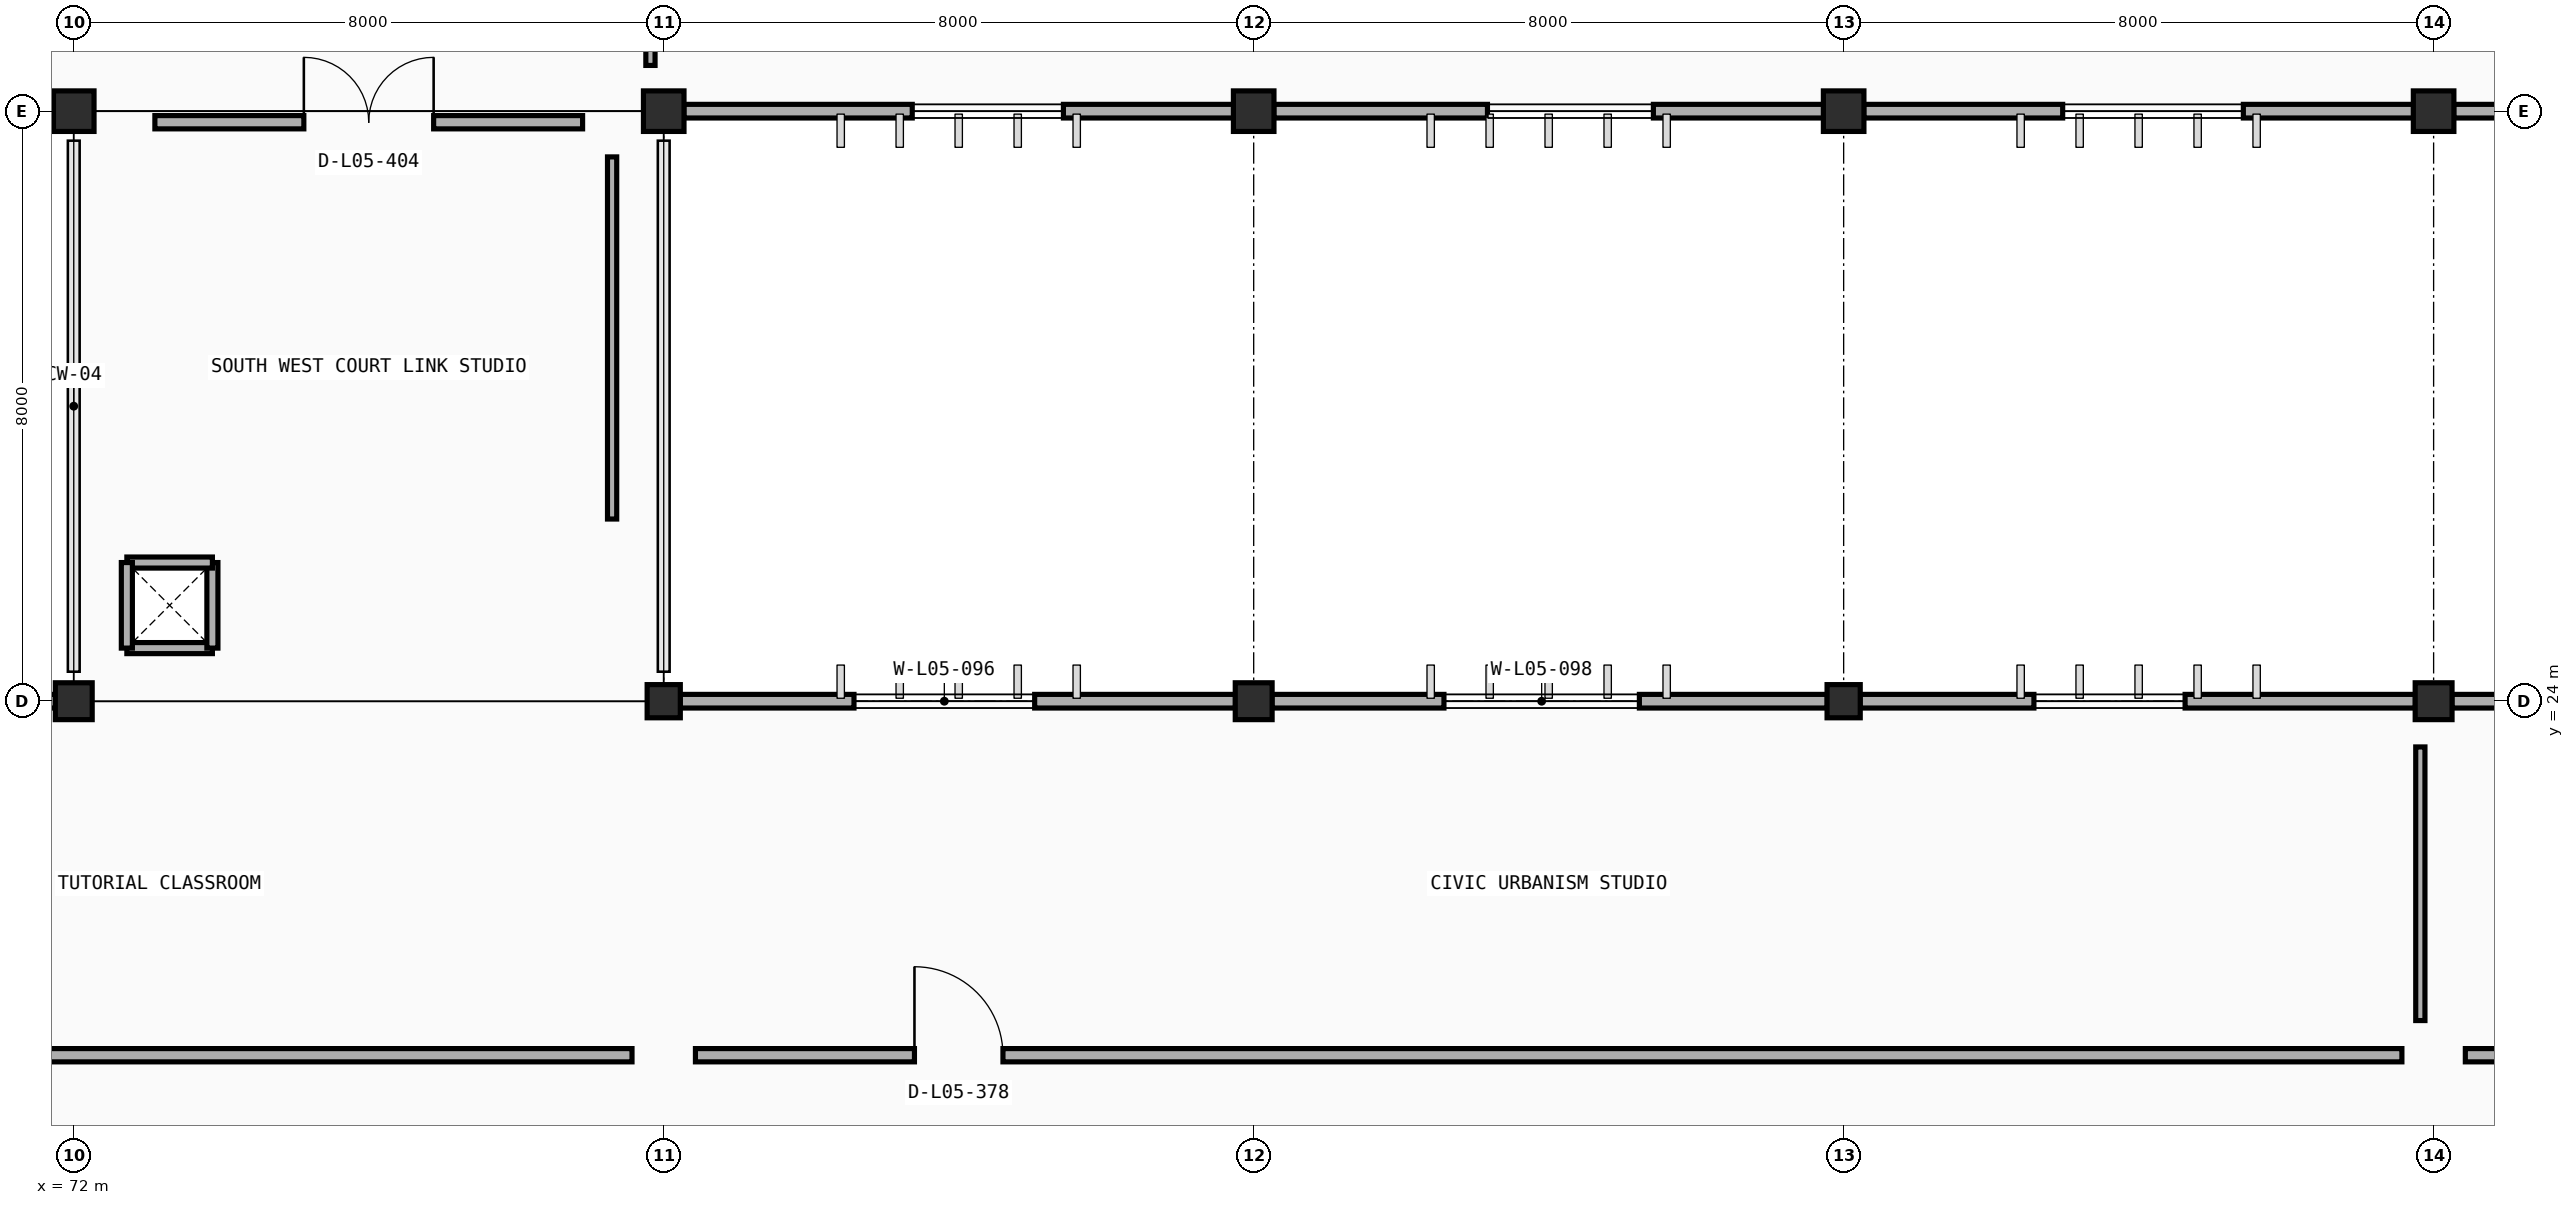
"""IFC4 building model, lengths in metres.
Left out: names, types, materials, properties, quantities, classifications, styles, units other than length and angle.
Written with IfcOpenShell. Run it as: python <this file> out.ifc"""

import sys

from ifc_helpers import new_model, si_unit, direction, frame, frame_2d, origin, origin_2d, place, context, subcontext, project, spatial, rectangle, extrude, element, fill, save


model = new_model("IFC4")
c1 = context("Model", 3, precision=1e-05, world=origin(), true_north=direction((0.0, 1.0)))
c2 = subcontext(c1, "Body", "Model", "MODEL_VIEW")
j1 = project(units=[si_unit("LENGTHUNIT", "METRE"), si_unit("PLANEANGLEUNIT", "RADIAN")], contexts=[c1])
p1 = place(None, origin())
s1 = spatial("IfcSite", under=j1, at=p1, CompositionType="ELEMENT")
p2 = place(p1, origin())
s2 = spatial("IfcBuilding", under=s1, at=p2, CompositionType="ELEMENT")
p3 = place(p2, frame((0.0, 0.0, 18.0)))
s3 = spatial("IfcBuildingStorey", under=s2, at=p3, CompositionType="ELEMENT", Elevation=18.0)
p4 = place(p3, frame((72.0, 24.0, 0.0), z_axis=(0.0, 0.0, 1.0), x_axis=(1.0, 0.0, 0.0)))
e1 = element("IfcColumn", 1, at=p4, inside=s3, PredefinedType="COLUMN", context=c2, shape_type="SweptSolid", body=[
    extrude(rectangle(XDim=0.5, YDim=0.5, at=origin_2d()), origin(), (0.0, 0.0, 1.0), 4.2),
])
p5 = place(p3, frame((80.0, 24.0, 0.0), z_axis=(0.0, 0.0, 1.0), x_axis=(1.0, 0.0, 0.0)))
e2 = element("IfcColumn", 2, at=p5, inside=s3, PredefinedType="COLUMN", context=c2, shape_type="SweptSolid", body=[
    extrude(rectangle(XDim=0.45, YDim=0.45, at=origin_2d()), origin(), (0.0, 0.0, 1.0), 4.2),
])
p6 = place(p3, frame((88.0, 24.0, 0.0), z_axis=(0.0, 0.0, 1.0), x_axis=(1.0, 0.0, 0.0)))
e3 = element("IfcColumn", 3, at=p6, inside=s3, PredefinedType="COLUMN", context=c2, shape_type="SweptSolid", body=[
    extrude(rectangle(XDim=0.5, YDim=0.5, at=origin_2d()), origin(), (0.0, 0.0, 1.0), 4.2),
])
p7 = place(p3, frame((96.0, 24.0, 0.0), z_axis=(0.0, 0.0, 1.0), x_axis=(1.0, 0.0, 0.0)))
e4 = element("IfcColumn", 4, at=p7, inside=s3, PredefinedType="COLUMN", context=c2, shape_type="SweptSolid", body=[
    extrude(rectangle(XDim=0.45, YDim=0.45, at=origin_2d()), origin(), (0.0, 0.0, 1.0), 4.2),
])
p8 = place(p3, frame((104.0, 24.0, 0.0), z_axis=(0.0, 0.0, 1.0), x_axis=(1.0, 0.0, 0.0)))
e5 = element("IfcColumn", 5, at=p8, inside=s3, PredefinedType="COLUMN", context=c2, shape_type="SweptSolid", body=[
    extrude(rectangle(XDim=0.5, YDim=0.5, at=origin_2d()), origin(), (0.0, 0.0, 1.0), 4.2),
])
for number, where, z_axis, x_axis in (
    (6, (72.0, 32.0, 0.0), (0.0, 0.0, 1.0), (1.0, 0.0, 0.0)),
    (7, (80.0, 32.0, 0.0), (0.0, 0.0, 1.0), (1.0, 0.0, 0.0)),
    (8, (88.0, 32.0, 0.0), (0.0, 0.0, 1.0), (1.0, 0.0, 0.0)),
    (9, (96.0, 32.0, 0.0), (0.0, 0.0, 1.0), (1.0, 0.0, 0.0)),
    (10, (104.0, 32.0, 0.0), (0.0, 0.0, 1.0), (1.0, 0.0, 0.0)),
):
    element("IfcColumn", number, at=place(p3, frame(where, z_axis=z_axis, x_axis=x_axis)), inside=s3, PredefinedType="COLUMN", context=c2, shape_type="SweptSolid", body=[
        extrude(rectangle(XDim=0.55, YDim=0.55, at=origin_2d()), origin(), (0.0, 0.0, 1.0), 4.2),
    ])
p9 = place(p3, frame((64.222, 24.0, 0.0), z_axis=(0.0, 0.0, 1.0), x_axis=(1.0, 0.0, 0.0)))
e11 = element("IfcWall", 11, at=p9, inside=s3, PredefinedType="STANDARD", context=c2, shape_type="SweptSolid", body=[
    extrude(rectangle(XDim=7.531, YDim=0.185, at=frame_2d((3.766, 0.0))), origin(), (0.0, 0.0, 1.0), 3.335),
])
p10 = place(p9, frame((2.358, 0.0, 0.9)))
e12 = element("IfcOpeningElement", 12, at=p10, cuts=e11, PredefinedType="OPENING", context=c2, shape_type="SweptSolid", body=[
    extrude(rectangle(XDim=2.05, YDim=1.4, at=frame_2d((1.025, 0.7))), frame((0.0, 0.103, 0.0), z_axis=(0.0, -1.0, 0.0), x_axis=(1.0, 0.0, 0.0)), (0.0, 0.0, 1.0), 0.205),
])
p11 = place(p3, frame((80.222, 24.0, 0.0), z_axis=(0.0, 0.0, 1.0), x_axis=(1.0, 0.0, 0.0)))
e13 = element("IfcWall", 13, at=p11, inside=s3, PredefinedType="STANDARD", context=c2, shape_type="SweptSolid", body=[
    extrude(rectangle(XDim=7.531, YDim=0.185, at=frame_2d((3.766, 0.0))), origin(), (0.0, 0.0, 1.0), 3.335),
])
p12 = place(p11, frame((2.358, 0.0, 0.9)))
e14 = element("IfcOpeningElement", 14, at=p12, cuts=e13, PredefinedType="OPENING", context=c2, shape_type="SweptSolid", body=[
    extrude(rectangle(XDim=2.45, YDim=1.4, at=frame_2d((1.225, 0.7))), frame((0.0, 0.103, 0.0), z_axis=(0.0, -1.0, 0.0), x_axis=(1.0, 0.0, 0.0)), (0.0, 0.0, 1.0), 0.205),
])
p13 = place(p3, frame((88.247, 24.0, 0.0), z_axis=(0.0, 0.0, 1.0), x_axis=(1.0, 0.0, 0.0)))
e15 = element("IfcWall", 15, at=p13, inside=s3, PredefinedType="STANDARD", context=c2, shape_type="SweptSolid", body=[
    extrude(rectangle(XDim=7.531, YDim=0.185, at=frame_2d((3.766, 0.0))), origin(), (0.0, 0.0, 1.0), 3.335),
])
p14 = place(p13, frame((2.333, 0.0, 0.9)))
e16 = element("IfcOpeningElement", 16, at=p14, cuts=e15, PredefinedType="OPENING", context=c2, shape_type="SweptSolid", body=[
    extrude(rectangle(XDim=2.65, YDim=1.4, at=frame_2d((1.325, 0.7))), frame((0.0, 0.103, 0.0), z_axis=(0.0, -1.0, 0.0), x_axis=(1.0, 0.0, 0.0)), (0.0, 0.0, 1.0), 0.205),
])
p15 = place(p3, frame((96.222, 24.0, 0.0), z_axis=(0.0, 0.0, 1.0), x_axis=(1.0, 0.0, 0.0)))
e17 = element("IfcWall", 17, at=p15, inside=s3, PredefinedType="STANDARD", context=c2, shape_type="SweptSolid", body=[
    extrude(rectangle(XDim=7.531, YDim=0.185, at=frame_2d((3.766, 0.0))), origin(), (0.0, 0.0, 1.0), 3.335),
])
p16 = place(p15, frame((2.358, 0.0, 0.9)))
e18 = element("IfcOpeningElement", 18, at=p16, cuts=e17, PredefinedType="OPENING", context=c2, shape_type="SweptSolid", body=[
    extrude(rectangle(XDim=2.05, YDim=1.4, at=frame_2d((1.025, 0.7))), frame((0.0, 0.103, 0.0), z_axis=(0.0, -1.0, 0.0), x_axis=(1.0, 0.0, 0.0)), (0.0, 0.0, 1.0), 0.205),
])
p17 = place(p3, frame((104.247, 24.0, 0.0), z_axis=(0.0, 0.0, 1.0), x_axis=(1.0, 0.0, 0.0)))
e19 = element("IfcWall", 19, at=p17, inside=s3, PredefinedType="STANDARD", context=c2, shape_type="SweptSolid", body=[
    extrude(rectangle(XDim=7.531, YDim=0.185, at=frame_2d((3.766, 0.0))), origin(), (0.0, 0.0, 1.0), 3.335),
])
p18 = place(p17, frame((2.333, 0.0, 0.9)))
e20 = element("IfcOpeningElement", 20, at=p18, cuts=e19, PredefinedType="OPENING", context=c2, shape_type="SweptSolid", body=[
    extrude(rectangle(XDim=2.25, YDim=1.4, at=frame_2d((1.125, 0.7))), frame((0.0, 0.103, 0.0), z_axis=(0.0, -1.0, 0.0), x_axis=(1.0, 0.0, 0.0)), (0.0, 0.0, 1.0), 0.205),
])
p19 = place(p3, frame((71.728, 32.0, 0.0), z_axis=(0.0, 0.0, 1.0), x_axis=(-1.0, 0.0, 0.0)))
e21 = element("IfcWall", 21, at=p19, inside=s3, PredefinedType="STANDARD", context=c2, shape_type="SweptSolid", body=[
    extrude(rectangle(XDim=7.456, YDim=0.185, at=frame_2d((3.728, 0.0))), origin(), (0.0, 0.0, 1.0), 3.335),
])
p20 = place(p19, frame((2.308, 0.0, 0.9)))
e22 = element("IfcOpeningElement", 22, at=p20, cuts=e21, PredefinedType="OPENING", context=c2, shape_type="SweptSolid", body=[
    extrude(rectangle(XDim=2.25, YDim=1.55, at=frame_2d((1.125, 0.775))), frame((0.0, 0.103, 0.0), z_axis=(0.0, -1.0, 0.0), x_axis=(1.0, 0.0, 0.0)), (0.0, 0.0, 1.0), 0.205),
])
p21 = place(p3, frame((87.728, 32.0, 0.0), z_axis=(0.0, 0.0, 1.0), x_axis=(-1.0, 0.0, 0.0)))
e23 = element("IfcWall", 23, at=p21, inside=s3, PredefinedType="STANDARD", context=c2, shape_type="SweptSolid", body=[
    extrude(rectangle(XDim=7.456, YDim=0.185, at=frame_2d((3.728, 0.0))), origin(), (0.0, 0.0, 1.0), 3.335),
])
p22 = place(p21, frame((2.308, 0.0, 0.9)))
e24 = element("IfcOpeningElement", 24, at=p22, cuts=e23, PredefinedType="OPENING", context=c2, shape_type="SweptSolid", body=[
    extrude(rectangle(XDim=2.05, YDim=1.55, at=frame_2d((1.025, 0.775))), frame((0.0, 0.103, 0.0), z_axis=(0.0, -1.0, 0.0), x_axis=(1.0, 0.0, 0.0)), (0.0, 0.0, 1.0), 0.205),
])
p23 = place(p3, frame((95.728, 32.0, 0.0), z_axis=(0.0, 0.0, 1.0), x_axis=(-1.0, 0.0, 0.0)))
e25 = element("IfcWall", 25, at=p23, inside=s3, PredefinedType="STANDARD", context=c2, shape_type="SweptSolid", body=[
    extrude(rectangle(XDim=7.456, YDim=0.185, at=frame_2d((3.728, 0.0))), origin(), (0.0, 0.0, 1.0), 3.335),
])
p24 = place(p23, frame((2.308, 0.0, 0.9)))
e26 = element("IfcOpeningElement", 26, at=p24, cuts=e25, PredefinedType="OPENING", context=c2, shape_type="SweptSolid", body=[
    extrude(rectangle(XDim=2.25, YDim=1.55, at=frame_2d((1.125, 0.775))), frame((0.0, 0.103, 0.0), z_axis=(0.0, -1.0, 0.0), x_axis=(1.0, 0.0, 0.0)), (0.0, 0.0, 1.0), 0.205),
])
p25 = place(p3, frame((103.728, 32.0, 0.0), z_axis=(0.0, 0.0, 1.0), x_axis=(-1.0, 0.0, 0.0)))
e27 = element("IfcWall", 27, at=p25, inside=s3, PredefinedType="STANDARD", context=c2, shape_type="SweptSolid", body=[
    extrude(rectangle(XDim=7.456, YDim=0.185, at=frame_2d((3.728, 0.0))), origin(), (0.0, 0.0, 1.0), 3.335),
])
p26 = place(p25, frame((2.308, 0.0, 0.9)))
e28 = element("IfcOpeningElement", 28, at=p26, cuts=e27, PredefinedType="OPENING", context=c2, shape_type="SweptSolid", body=[
    extrude(rectangle(XDim=2.45, YDim=1.55, at=frame_2d((1.225, 0.775))), frame((0.0, 0.103, 0.0), z_axis=(0.0, -1.0, 0.0), x_axis=(1.0, 0.0, 0.0)), (0.0, 0.0, 1.0), 0.205),
])
p27 = place(p3, frame((111.728, 32.0, 0.0), z_axis=(0.0, 0.0, 1.0), x_axis=(-1.0, 0.0, 0.0)))
e29 = element("IfcWall", 29, at=p27, inside=s3, PredefinedType="STANDARD", context=c2, shape_type="SweptSolid", body=[
    extrude(rectangle(XDim=7.456, YDim=0.185, at=frame_2d((3.728, 0.0))), origin(), (0.0, 0.0, 1.0), 3.335),
])
p28 = place(p27, frame((2.308, 0.0, 0.9)))
e30 = element("IfcOpeningElement", 30, at=p28, cuts=e29, PredefinedType="OPENING", context=c2, shape_type="SweptSolid", body=[
    extrude(rectangle(XDim=2.05, YDim=1.55, at=frame_2d((1.025, 0.775))), frame((0.0, 0.103, 0.0), z_axis=(0.0, -1.0, 0.0), x_axis=(1.0, 0.0, 0.0)), (0.0, 0.0, 1.0), 0.205),
])
for number, where, z_axis, x_axis in (
    (31, (72.72, 24.72, 0.0), (0.0, 0.0, 1.0), (1.0, 0.0, 0.0)),
    (32, (73.88, 24.72, 0.0), (0.0, 0.0, 1.0), (0.0, 1.0, 0.0)),
    (33, (73.88, 25.88, 0.0), (0.0, 0.0, 1.0), (-1.0, 0.0, 0.0)),
    (34, (72.72, 25.88, 0.0), (0.0, 0.0, 1.0), (0.0, -1.0, 0.0)),
):
    element("IfcWall", number, at=place(p3, frame(where, z_axis=z_axis, x_axis=x_axis)), inside=s3, PredefinedType="PARTITIONING", context=c2, shape_type="SweptSolid", body=[
        extrude(rectangle(XDim=1.16, YDim=0.15, at=frame_2d((0.58, 0.0))), origin(), (0.0, 0.0, 1.0), 3.9),
    ])
p29 = place(p3, frame((64.43, 19.2, 0.0), z_axis=(0.0, 0.0, 1.0), x_axis=(1.0, 0.0, 0.0)))
e35 = element("IfcWall", 35, at=p29, inside=s3, PredefinedType="PARTITIONING", context=c2, shape_type="SweptSolid", body=[
    extrude(rectangle(XDim=15.14, YDim=0.18, at=frame_2d((7.57, 0.0))), origin(), (0.0, 0.0, 1.0), 3.3),
])
p30 = place(p29, frame((3.0, 0.0, 0.0)))
e36 = element("IfcOpeningElement", 36, at=p30, cuts=e35, PredefinedType="OPENING", context=c2, shape_type="SweptSolid", body=[
    extrude(rectangle(XDim=1.14, YDim=2.15, at=frame_2d((0.57, 1.075))), frame((0.0, 0.1, 0.0), z_axis=(0.0, -1.0, 0.0), x_axis=(1.0, 0.0, 0.0)), (0.0, 0.0, 1.0), 0.2),
])
p31 = place(p3, frame((80.43, 19.2, 0.0), z_axis=(0.0, 0.0, 1.0), x_axis=(1.0, 0.0, 0.0)))
e37 = element("IfcWall", 37, at=p31, inside=s3, PredefinedType="PARTITIONING", context=c2, shape_type="SweptSolid", body=[
    extrude(rectangle(XDim=23.14, YDim=0.18, at=frame_2d((11.57, 0.0))), origin(), (0.0, 0.0, 1.0), 3.3),
])
p32 = place(p31, frame((2.97, 0.0, 0.0)))
e38 = element("IfcOpeningElement", 38, at=p32, cuts=e37, PredefinedType="OPENING", context=c2, shape_type="SweptSolid", body=[
    extrude(rectangle(XDim=1.2, YDim=2.15, at=frame_2d((0.6, 1.075))), frame((0.0, 0.1, 0.0), z_axis=(0.0, -1.0, 0.0), x_axis=(1.0, 0.0, 0.0)), (0.0, 0.0, 1.0), 0.2),
])
p33 = place(p3, frame((103.82, 19.67, 0.0), z_axis=(0.0, 0.0, 1.0), x_axis=(0.0, 1.0, 0.0)))
e39 = element("IfcWall", 39, at=p33, inside=s3, PredefinedType="PARTITIONING", context=c2, shape_type="SweptSolid", body=[
    extrude(rectangle(XDim=3.71, YDim=0.125, at=frame_2d((1.855, 0.0))), origin(), (0.0, 0.0, 1.0), 3.3),
])
p34 = place(p3, frame((104.43, 19.2, 0.0), z_axis=(0.0, 0.0, 1.0), x_axis=(1.0, 0.0, 0.0)))
e40 = element("IfcWall", 40, at=p34, inside=s3, PredefinedType="PARTITIONING", context=c2, shape_type="SweptSolid", body=[
    extrude(rectangle(XDim=23.14, YDim=0.18, at=frame_2d((11.57, 0.0))), origin(), (0.0, 0.0, 1.0), 3.3),
])
p35 = place(p34, frame((2.8, 0.0, 0.0)))
e41 = element("IfcOpeningElement", 41, at=p35, cuts=e40, PredefinedType="OPENING", context=c2, shape_type="SweptSolid", body=[
    extrude(rectangle(XDim=1.54, YDim=2.2, at=frame_2d((0.77, 1.1))), frame((0.0, 0.1, 0.0), z_axis=(0.0, -1.0, 0.0), x_axis=(1.0, 0.0, 0.0)), (0.0, 0.0, 1.0), 0.2),
])
p36 = place(p3, frame((79.82, 32.62, 0.0), z_axis=(0.0, 0.0, 1.0), x_axis=(0.0, 1.0, 0.0)))
e42 = element("IfcWall", 42, at=p36, inside=s3, PredefinedType="PARTITIONING", context=c2, shape_type="SweptSolid", body=[
    extrude(rectangle(XDim=6.81, YDim=0.125, at=frame_2d((3.405, 0.0))), origin(), (0.0, 0.0, 1.0), 3.3),
])
p37 = place(p3, frame((73.1, 31.85, 0.0), z_axis=(0.0, 0.0, 1.0), x_axis=(1.0, 0.0, 0.0)))
e43 = element("IfcWall", 43, at=p37, inside=s3, PredefinedType="PARTITIONING", context=c2, shape_type="SweptSolid", body=[
    extrude(rectangle(XDim=5.8, YDim=0.18, at=frame_2d((2.9, 0.0))), origin(), (0.0, 0.0, 1.0), 3.3),
])
p38 = place(p37, frame((2.02, 0.0, 0.0)))
e44 = element("IfcOpeningElement", 44, at=p38, cuts=e43, PredefinedType="OPENING", context=c2, shape_type="SweptSolid", body=[
    extrude(rectangle(XDim=1.76, YDim=2.25, at=frame_2d((0.88, 1.125))), frame((0.0, 0.1, 0.0), z_axis=(0.0, -1.0, 0.0), x_axis=(1.0, 0.0, 0.0)), (0.0, 0.0, 1.0), 0.2),
])
p39 = place(p3, frame((79.3, 26.47, 0.0), z_axis=(0.0, 0.0, 1.0), x_axis=(0.0, 1.0, 0.0)))
e45 = element("IfcWall", 45, at=p39, inside=s3, PredefinedType="PARTITIONING", context=c2, shape_type="SweptSolid", body=[
    extrude(rectangle(XDim=4.91, YDim=0.125, at=frame_2d((2.455, 0.0))), origin(), (0.0, 0.0, 1.0), 3.3),
])
p40 = place(p12, origin())
e46 = element("IfcWindow", 46, at=p40, inside=s3, PartitioningType="DOUBLE_PANEL_VERTICAL", PredefinedType="WINDOW", context=c2, shape_type="SweptSolid", body=[
    extrude(rectangle(XDim=2.45, YDim=1.4, at=frame_2d((1.225, 0.7))), frame((0.0, 0.03, 0.0), z_axis=(0.0, -1.0, 0.0), x_axis=(1.0, 0.0, 0.0)), (0.0, 0.0, 1.0), 0.06),
])
fill(e14, e46)
p41 = place(p14, origin())
e47 = element("IfcWindow", 47, at=p41, inside=s3, PartitioningType="DOUBLE_PANEL_VERTICAL", PredefinedType="WINDOW", context=c2, shape_type="SweptSolid", body=[
    extrude(rectangle(XDim=2.65, YDim=1.4, at=frame_2d((1.325, 0.7))), frame((0.0, 0.03, 0.0), z_axis=(0.0, -1.0, 0.0), x_axis=(1.0, 0.0, 0.0)), (0.0, 0.0, 1.0), 0.06),
])
fill(e16, e47)
p42 = place(p16, origin())
e48 = element("IfcWindow", 48, at=p42, inside=s3, PartitioningType="DOUBLE_PANEL_VERTICAL", PredefinedType="WINDOW", context=c2, shape_type="SweptSolid", body=[
    extrude(rectangle(XDim=2.05, YDim=1.4, at=frame_2d((1.025, 0.7))), frame((0.0, 0.03, 0.0), z_axis=(0.0, -1.0, 0.0), x_axis=(1.0, 0.0, 0.0)), (0.0, 0.0, 1.0), 0.06),
])
fill(e18, e48)
p43 = place(p22, origin())
e49 = element("IfcWindow", 49, at=p43, inside=s3, PartitioningType="DOUBLE_PANEL_VERTICAL", PredefinedType="WINDOW", context=c2, shape_type="SweptSolid", body=[
    extrude(rectangle(XDim=2.05, YDim=1.55, at=frame_2d((1.025, 0.775))), frame((0.0, 0.03, 0.0), z_axis=(0.0, -1.0, 0.0), x_axis=(1.0, 0.0, 0.0)), (0.0, 0.0, 1.0), 0.06),
])
fill(e24, e49)
p44 = place(p24, origin())
e50 = element("IfcWindow", 50, at=p44, inside=s3, PartitioningType="DOUBLE_PANEL_VERTICAL", PredefinedType="WINDOW", context=c2, shape_type="SweptSolid", body=[
    extrude(rectangle(XDim=2.25, YDim=1.55, at=frame_2d((1.125, 0.775))), frame((0.0, 0.03, 0.0), z_axis=(0.0, -1.0, 0.0), x_axis=(1.0, 0.0, 0.0)), (0.0, 0.0, 1.0), 0.06),
])
fill(e26, e50)
p45 = place(p26, origin())
e51 = element("IfcWindow", 51, at=p45, inside=s3, PartitioningType="DOUBLE_PANEL_VERTICAL", PredefinedType="WINDOW", context=c2, shape_type="SweptSolid", body=[
    extrude(rectangle(XDim=2.45, YDim=1.55, at=frame_2d((1.225, 0.775))), frame((0.0, 0.03, 0.0), z_axis=(0.0, -1.0, 0.0), x_axis=(1.0, 0.0, 0.0)), (0.0, 0.0, 1.0), 0.06),
])
fill(e28, e51)
p46 = place(p32, origin())
e52 = element("IfcDoor", 52, at=p46, inside=s3, OperationType="SINGLE_SWING_LEFT", PredefinedType="DOOR", context=c2, shape_type="SweptSolid", body=[
    extrude(rectangle(XDim=1.2, YDim=2.15, at=frame_2d((0.6, 1.075))), frame((0.0, 0.025, 0.0), z_axis=(0.0, -1.0, 0.0), x_axis=(1.0, 0.0, 0.0)), (0.0, 0.0, 1.0), 0.05),
])
fill(e38, e52)
p47 = place(p38, origin())
e53 = element("IfcDoor", 53, at=p47, inside=s3, OperationType="DOUBLE_DOOR_SINGLE_SWING", PredefinedType="DOOR", context=c2, shape_type="SweptSolid", body=[
    extrude(rectangle(XDim=1.76, YDim=2.25, at=frame_2d((0.88, 1.125))), frame((0.0, 0.025, 0.0), z_axis=(0.0, -1.0, 0.0), x_axis=(1.0, 0.0, 0.0)), (0.0, 0.0, 1.0), 0.05),
])
fill(e44, e53)
save(model, sys.argv[1])
